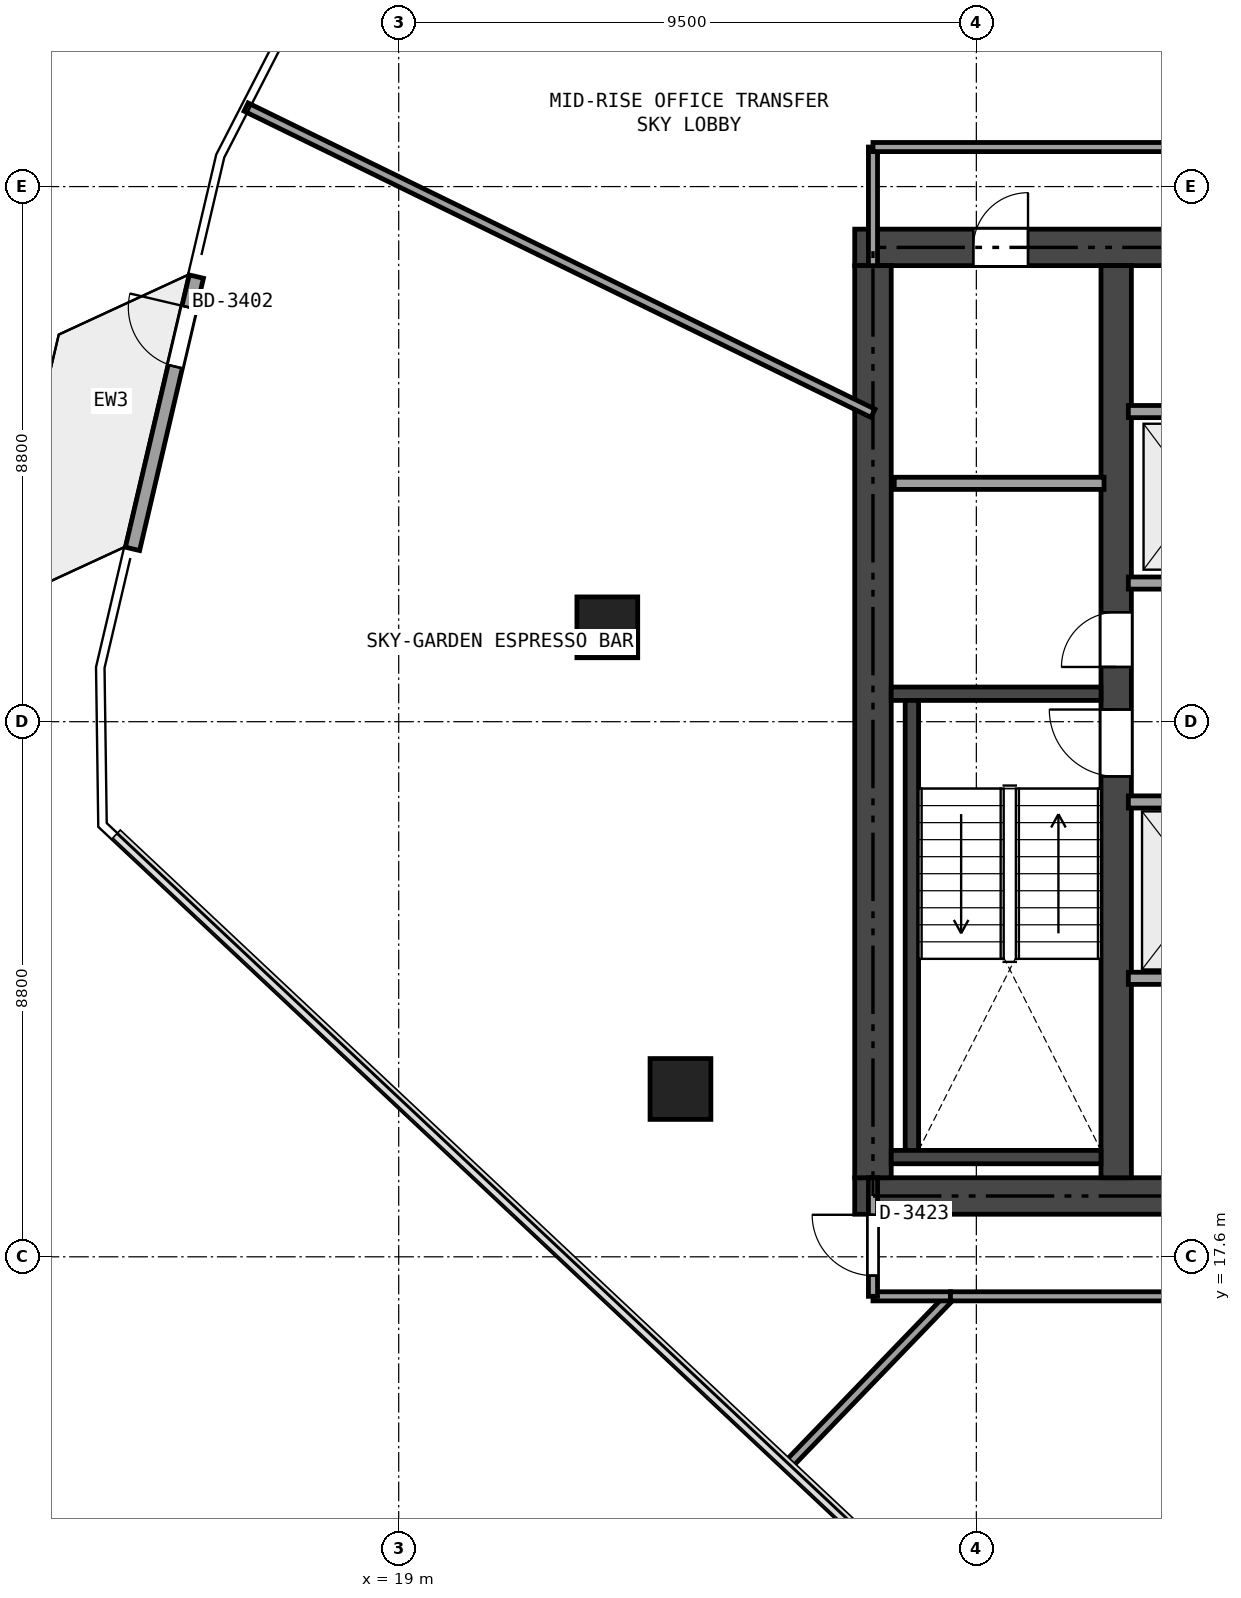
"""IFC4 building model, lengths in metres.
Left out: names, types, materials, properties, quantities, classifications, styles, units other than length and angle.
Written with IfcOpenShell. Run it as: python <this file> out.ifc"""

import sys

from ifc_helpers import new_model, si_unit, direction, frame, frame_2d, origin, origin_2d, place, context, subcontext, project, spatial, rectangle, extrude, element, fill, save


model = new_model("IFC4")
c1 = context("Model", 3, precision=1e-05, world=origin(), true_north=direction((0.0, 1.0)))
c2 = subcontext(c1, "Body", "Model", "MODEL_VIEW")
j1 = project(units=[si_unit("LENGTHUNIT", "METRE"), si_unit("PLANEANGLEUNIT", "RADIAN")], contexts=[c1])
p1 = place(None, origin())
s1 = spatial("IfcSite", under=j1, at=p1, CompositionType="ELEMENT")
p2 = place(p1, origin())
s2 = spatial("IfcBuilding", under=s1, at=p2, CompositionType="ELEMENT")
p3 = place(p2, frame((0.0, 0.0, 129.3)))
s3 = spatial("IfcBuildingStorey", under=s2, at=p3, CompositionType="ELEMENT", Elevation=129.3)
p4 = place(p3, frame((26.5, 18.6, 0.0), z_axis=(0.0, 0.0, 1.0), x_axis=(1.0, 0.0, 0.0)))
e1 = element("IfcWall", 1, at=p4, inside=s3, PredefinedType="SHEAR", context=c2, shape_type="SweptSolid", body=[
    extrude(rectangle(XDim=21.4, YDim=0.6, at=frame_2d((10.7, 0.0))), origin(), (0.0, 0.0, 1.0), 3.32),
])
p5 = place(p4, frame((12.425, 0.0, 0.0)))
e2 = element("IfcOpeningElement", 2, at=p5, cuts=e1, PredefinedType="OPENING", context=c2, shape_type="SweptSolid", body=[
    extrude(rectangle(XDim=1.15, YDim=2.15, at=frame_2d((0.575, 1.075))), frame((0.0, 0.31, 0.0), z_axis=(0.0, -1.0, 0.0), x_axis=(1.0, 0.0, 0.0)), (0.0, 0.0, 1.0), 0.62),
])
p6 = place(p4, frame((5.25, 0.0, 0.0)))
e3 = element("IfcOpeningElement", 3, at=p6, cuts=e1, PredefinedType="OPENING", context=c2, shape_type="SweptSolid", body=[
    extrude(rectangle(XDim=0.9, YDim=2.1, at=frame_2d((0.45, 1.05))), frame((0.0, 0.31, 0.0), z_axis=(0.0, -1.0, 0.0), x_axis=(1.0, 0.0, 0.0)), (0.0, 0.0, 1.0), 0.62),
])
p7 = place(p3, frame((26.5, 34.2, 0.0), z_axis=(0.0, 0.0, 1.0), x_axis=(1.0, 0.0, 0.0)))
e4 = element("IfcWall", 4, at=p7, inside=s3, PredefinedType="SHEAR", context=c2, shape_type="SweptSolid", body=[
    extrude(rectangle(XDim=21.4, YDim=0.6, at=frame_2d((10.7, 0.0))), origin(), (0.0, 0.0, 1.0), 3.32),
])
p8 = place(p7, frame((9.7, 0.0, 0.0)))
e5 = element("IfcOpeningElement", 5, at=p8, cuts=e4, PredefinedType="OPENING", context=c2, shape_type="SweptSolid", body=[
    extrude(rectangle(XDim=1.1, YDim=2.15, at=frame_2d((0.55, 1.075))), frame((0.0, 0.31, 0.0), z_axis=(0.0, -1.0, 0.0), x_axis=(1.0, 0.0, 0.0)), (0.0, 0.0, 1.0), 0.62),
])
p9 = place(p7, frame((1.95, 0.0, 0.0)))
e6 = element("IfcOpeningElement", 6, at=p9, cuts=e4, PredefinedType="OPENING", context=c2, shape_type="SweptSolid", body=[
    extrude(rectangle(XDim=0.9, YDim=2.1, at=frame_2d((0.45, 1.05))), frame((0.0, 0.31, 0.0), z_axis=(0.0, -1.0, 0.0), x_axis=(1.0, 0.0, 0.0)), (0.0, 0.0, 1.0), 0.62),
])
p10 = place(p7, frame((6.25, 0.0, 0.0)))
e7 = element("IfcOpeningElement", 7, at=p10, cuts=e4, PredefinedType="OPENING", context=c2, shape_type="SweptSolid", body=[
    extrude(rectangle(XDim=0.9, YDim=2.1, at=frame_2d((0.45, 1.05))), frame((0.0, 0.31, 0.0), z_axis=(0.0, -1.0, 0.0), x_axis=(1.0, 0.0, 0.0)), (0.0, 0.0, 1.0), 0.62),
])
p11 = place(p3, frame((26.8, 18.9, 0.0), z_axis=(0.0, 0.0, 1.0), x_axis=(0.0, 1.0, 0.0)))
e8 = element("IfcWall", 8, at=p11, inside=s3, PredefinedType="SHEAR", context=c2, shape_type="SweptSolid", body=[
    extrude(rectangle(XDim=15.0, YDim=0.6, at=frame_2d((7.5, 0.0))), origin(), (0.0, 0.0, 1.0), 3.32),
])
p12 = place(p3, frame((30.8, 18.9, 0.0), z_axis=(0.0, 0.0, 1.0), x_axis=(0.0, 1.0, 0.0)))
e9 = element("IfcWall", 9, at=p12, inside=s3, PredefinedType="SHEAR", context=c2, shape_type="SweptSolid", body=[
    extrude(rectangle(XDim=15.0, YDim=0.5, at=frame_2d((7.5, 0.0))), origin(), (0.0, 0.0, 1.0), 3.32),
])
p13 = place(p12, frame((6.6, 0.0, 0.0)))
e10 = element("IfcOpeningElement", 10, at=p13, cuts=e9, PredefinedType="OPENING", context=c2, shape_type="SweptSolid", body=[
    extrude(rectangle(XDim=1.1, YDim=2.15, at=frame_2d((0.55, 1.075))), frame((0.0, 0.26, 0.0), z_axis=(0.0, -1.0, 0.0), x_axis=(1.0, 0.0, 0.0)), (0.0, 0.0, 1.0), 0.52),
])
p14 = place(p12, frame((8.4, 0.0, 0.0)))
e11 = element("IfcOpeningElement", 11, at=p14, cuts=e9, PredefinedType="OPENING", context=c2, shape_type="SweptSolid", body=[
    extrude(rectangle(XDim=0.9, YDim=2.1, at=frame_2d((0.45, 1.05))), frame((0.0, 0.26, 0.0), z_axis=(0.0, -1.0, 0.0), x_axis=(1.0, 0.0, 0.0)), (0.0, 0.0, 1.0), 0.52),
])
p15 = place(p3, frame((27.1, 26.86, 0.0), z_axis=(0.0, 0.0, 1.0), x_axis=(1.0, 0.0, 0.0)))
e12 = element("IfcWall", 12, at=p15, inside=s3, PredefinedType="SHEAR", context=c2, shape_type="SweptSolid", body=[
    extrude(rectangle(XDim=3.45, YDim=0.22, at=frame_2d((1.725, 0.0))), origin(), (0.0, 0.0, 1.0), 3.32),
])
p16 = place(p3, frame((27.44, 19.35, 0.0), z_axis=(0.0, 0.0, 1.0), x_axis=(0.0, 1.0, 0.0)))
e13 = element("IfcWall", 13, at=p16, inside=s3, PredefinedType="SHEAR", context=c2, shape_type="SweptSolid", body=[
    extrude(rectangle(XDim=7.4, YDim=0.22, at=frame_2d((3.7, 0.0))), origin(), (0.0, 0.0, 1.0), 3.32),
])
p17 = place(p3, frame((27.1, 19.24, 0.0), z_axis=(0.0, 0.0, 1.0), x_axis=(1.0, 0.0, 0.0)))
e14 = element("IfcWall", 14, at=p17, inside=s3, PredefinedType="SHEAR", context=c2, shape_type="SweptSolid", body=[
    extrude(rectangle(XDim=3.45, YDim=0.22, at=frame_2d((1.725, 0.0))), origin(), (0.0, 0.0, 1.0), 3.32),
])
for number, where, z_axis, x_axis in (
    (15, (22.431, 27.952, 0.0), (0.0, 0.0, 1.0), (1.0, 0.0, 0.0)),
    (16, (23.634, 20.36, 0.0), (0.0, 0.0, 1.0), (1.0, 0.0, 0.0)),
):
    element("IfcColumn", number, at=place(p3, frame(where, z_axis=z_axis, x_axis=x_axis)), inside=s3, PredefinedType="COLUMN", context=c2, shape_type="SweptSolid", body=[
        extrude(rectangle(XDim=1.0, YDim=1.0, at=origin_2d()), origin(), (0.0, 0.0, 1.0), 3.32),
    ])
p18 = place(p3, frame((14.622, 29.242, 0.0), z_axis=(0.0, 0.0, 1.0), x_axis=(0.228296670508, 0.973591613684, 0.0)))
e17 = element("IfcWall", 17, at=p18, inside=s3, PredefinedType="SOLIDWALL", context=c2, shape_type="SweptSolid", body=[
    extrude(rectangle(XDim=4.6, YDim=0.24, at=frame_2d((2.3, 0.0))), origin(), (0.0, 0.0, 1.0), 3.32),
])
p19 = place(p18, frame((3.079, 0.0, 0.0)))
e18 = element("IfcOpeningElement", 18, at=p19, cuts=e17, PredefinedType="OPENING", context=c2, shape_type="SweptSolid", body=[
    extrude(rectangle(XDim=1.0, YDim=2.15, at=frame_2d((0.5, 1.075))), frame((0.0, 0.13, 0.0), z_axis=(0.0, -1.0, 0.0), x_axis=(1.0, 0.0, 0.0)), (0.0, 0.0, 1.0), 0.26),
])
p20 = place(p3, frame((27.15, 30.32, 0.0), z_axis=(0.0, 0.0, 1.0), x_axis=(1.0, 0.0, 0.0)))
e19 = element("IfcWall", 19, at=p20, inside=s3, PredefinedType="SOLIDWALL", context=c2, shape_type="SweptSolid", body=[
    extrude(rectangle(XDim=3.45, YDim=0.2, at=frame_2d((1.725, 0.0))), origin(), (0.0, 0.0, 1.0), 3.32),
])
p21 = place(p3, frame((31.0, 28.68, 0.0), z_axis=(0.0, 0.0, 1.0), x_axis=(1.0, 0.0, 0.0)))
e20 = element("IfcWall", 20, at=p21, inside=s3, PredefinedType="SOLIDWALL", context=c2, shape_type="SweptSolid", body=[
    extrude(rectangle(XDim=4.42, YDim=0.2, at=frame_2d((2.21, 0.0))), origin(), (0.0, 0.0, 1.0), 3.32),
])
p22 = place(p21, frame((0.6, 0.0, 0.0)))
e21 = element("IfcOpeningElement", 21, at=p22, cuts=e20, PredefinedType="OPENING", context=c2, shape_type="SweptSolid", body=[
    extrude(rectangle(XDim=1.1, YDim=2.15, at=frame_2d((0.55, 1.075))), frame((0.0, 0.11, 0.0), z_axis=(0.0, -1.0, 0.0), x_axis=(1.0, 0.0, 0.0)), (0.0, 0.0, 1.0), 0.22),
])
p23 = place(p21, frame((2.85, 0.0, 0.0)))
e22 = element("IfcOpeningElement", 22, at=p23, cuts=e20, PredefinedType="OPENING", context=c2, shape_type="SweptSolid", body=[
    extrude(rectangle(XDim=1.1, YDim=2.15, at=frame_2d((0.55, 1.075))), frame((0.0, 0.11, 0.0), z_axis=(0.0, -1.0, 0.0), x_axis=(1.0, 0.0, 0.0)), (0.0, 0.0, 1.0), 0.22),
])
p24 = place(p3, frame((31.0, 31.5, 0.0), z_axis=(0.0, 0.0, 1.0), x_axis=(1.0, 0.0, 0.0)))
e23 = element("IfcWall", 23, at=p24, inside=s3, PredefinedType="SOLIDWALL", context=c2, shape_type="SweptSolid", body=[
    extrude(rectangle(XDim=4.42, YDim=0.2, at=frame_2d((2.21, 0.0))), origin(), (0.0, 0.0, 1.0), 3.32),
])
p25 = place(p3, frame((31.0, 25.08, 0.0), z_axis=(0.0, 0.0, 1.0), x_axis=(1.0, 0.0, 0.0)))
e24 = element("IfcWall", 24, at=p25, inside=s3, PredefinedType="SOLIDWALL", context=c2, shape_type="SweptSolid", body=[
    extrude(rectangle(XDim=4.42, YDim=0.2, at=frame_2d((2.21, 0.0))), origin(), (0.0, 0.0, 1.0), 3.32),
])
p26 = place(p25, frame((3.0, 0.0, 0.0)))
e25 = element("IfcOpeningElement", 25, at=p26, cuts=e24, PredefinedType="OPENING", context=c2, shape_type="SweptSolid", body=[
    extrude(rectangle(XDim=0.9, YDim=2.1, at=frame_2d((0.45, 1.05))), frame((0.0, 0.11, 0.0), z_axis=(0.0, -1.0, 0.0), x_axis=(1.0, 0.0, 0.0)), (0.0, 0.0, 1.0), 0.22),
])
p27 = place(p25, frame((0.62, 0.0, 0.0)))
e26 = element("IfcOpeningElement", 26, at=p27, cuts=e24, PredefinedType="OPENING", context=c2, shape_type="SweptSolid", body=[
    extrude(rectangle(XDim=1.2, YDim=2.15, at=frame_2d((0.6, 1.075))), frame((0.0, 0.11, 0.0), z_axis=(0.0, -1.0, 0.0), x_axis=(1.0, 0.0, 0.0)), (0.0, 0.0, 1.0), 0.22),
])
p28 = place(p3, frame((31.0, 22.18, 0.0), z_axis=(0.0, 0.0, 1.0), x_axis=(1.0, 0.0, 0.0)))
e27 = element("IfcWall", 27, at=p28, inside=s3, PredefinedType="SOLIDWALL", context=c2, shape_type="SweptSolid", body=[
    extrude(rectangle(XDim=2.42, YDim=0.2, at=frame_2d((1.21, 0.0))), origin(), (0.0, 0.0, 1.0), 3.32),
])
p29 = place(p3, frame((16.49, 36.508, 0.0), z_axis=(0.0, 0.0, 1.0), x_axis=(0.898533562789, -0.4389048149, 0.0)))
e28 = element("IfcWall", 28, at=p29, inside=s3, PredefinedType="PARTITIONING", context=c2, shape_type="SweptSolid", body=[
    extrude(rectangle(XDim=11.474, YDim=0.15, at=frame_2d((5.737, 0.0))), origin(), (0.0, 0.0, 1.0), 2.805),
])
p30 = place(p3, frame((26.8, 33.9, 0.0), z_axis=(0.0, 0.0, 1.0), x_axis=(0.0, 1.0, 0.0)))
e29 = element("IfcWall", 29, at=p30, inside=s3, PredefinedType="PARTITIONING", context=c2, shape_type="SweptSolid", body=[
    extrude(rectangle(XDim=1.95, YDim=0.15, at=frame_2d((0.975, 0.0))), origin(), (0.0, 0.0, 1.0), 2.805),
])
p31 = place(p3, frame((26.8, 35.85, 0.0), z_axis=(0.0, 0.0, 1.0), x_axis=(1.0, 0.0, 0.0)))
e30 = element("IfcWall", 30, at=p31, inside=s3, PredefinedType="PARTITIONING", context=c2, shape_type="SweptSolid", body=[
    extrude(rectangle(XDim=11.33, YDim=0.15, at=frame_2d((5.665, 0.0))), origin(), (0.0, 0.0, 1.0), 2.687),
])
p32 = place(p31, frame((5.165, 0.0, 0.0)))
e31 = element("IfcOpeningElement", 31, at=p32, cuts=e30, PredefinedType="OPENING", context=c2, shape_type="SweptSolid", body=[
    extrude(rectangle(XDim=1.0, YDim=2.15, at=frame_2d((0.5, 1.075))), frame((0.0, 0.085, 0.0), z_axis=(0.0, -1.0, 0.0), x_axis=(1.0, 0.0, 0.0)), (0.0, 0.0, 1.0), 0.17),
])
p33 = place(p3, frame((25.378, 14.152, 0.0), z_axis=(0.0, 0.0, 1.0), x_axis=(0.693884355372, 0.720086454094, 0.0)))
e32 = element("IfcWall", 32, at=p33, inside=s3, PredefinedType="PARTITIONING", context=c2, shape_type="SweptSolid", body=[
    extrude(rectangle(XDim=3.885, YDim=0.15, at=frame_2d((1.943, 0.0))), origin(), (0.0, 0.0, 1.0), 2.805),
])
p34 = place(p3, frame((28.074, 16.95, 0.0), z_axis=(0.0, 0.0, 1.0), x_axis=(-1.0, 0.0, 0.0)))
e33 = element("IfcWall", 33, at=p34, inside=s3, PredefinedType="PARTITIONING", context=c2, shape_type="SweptSolid", body=[
    extrude(rectangle(XDim=1.274, YDim=0.15, at=frame_2d((0.637, 0.0))), origin(), (0.0, 0.0, 1.0), 2.805),
])
p35 = place(p3, frame((26.8, 16.95, 0.0), z_axis=(0.0, 0.0, 1.0), x_axis=(0.0, 1.0, 0.0)))
e34 = element("IfcWall", 34, at=p35, inside=s3, PredefinedType="PARTITIONING", context=c2, shape_type="SweptSolid", body=[
    extrude(rectangle(XDim=1.95, YDim=0.15, at=frame_2d((0.975, 0.0))), origin(), (0.0, 0.0, 1.0), 2.805),
])
p36 = place(p35, frame((0.341, 0.0, 0.0)))
e35 = element("IfcOpeningElement", 35, at=p36, cuts=e34, PredefinedType="OPENING", context=c2, shape_type="SweptSolid", body=[
    extrude(rectangle(XDim=1.0, YDim=2.15, at=frame_2d((0.5, 1.075))), frame((0.0, 0.085, 0.0), z_axis=(0.0, -1.0, 0.0), x_axis=(1.0, 0.0, 0.0)), (0.0, 0.0, 1.0), 0.17),
])
p37 = place(p3, frame((42.225, 16.95, 0.0), z_axis=(0.0, 0.0, 1.0), x_axis=(-1.0, 0.0, 0.0)))
e36 = element("IfcWall", 36, at=p37, inside=s3, PredefinedType="PARTITIONING", context=c2, shape_type="SweptSolid", body=[
    extrude(rectangle(XDim=14.151, YDim=0.15, at=frame_2d((7.076, 0.0))), origin(), (0.0, 0.0, 1.0), 2.687),
])
p38 = place(p37, frame((6.576, 0.0, 0.0)))
e37 = element("IfcOpeningElement", 37, at=p38, cuts=e36, PredefinedType="OPENING", context=c2, shape_type="SweptSolid", body=[
    extrude(rectangle(XDim=1.0, YDim=2.15, at=frame_2d((0.5, 1.075))), frame((0.0, 0.085, 0.0), z_axis=(0.0, -1.0, 0.0), x_axis=(1.0, 0.0, 0.0)), (0.0, 0.0, 1.0), 0.17),
])
p39 = place(p19, origin())
e38 = element("IfcDoor", 38, at=p39, inside=s3, OperationType="SINGLE_SWING_RIGHT", PredefinedType="DOOR", context=c2, shape_type="SweptSolid", body=[
    extrude(rectangle(XDim=1.0, YDim=2.15, at=frame_2d((0.5, 1.075))), frame((0.0, 0.025, 0.0), z_axis=(0.0, -1.0, 0.0), x_axis=(1.0, 0.0, 0.0)), (0.0, 0.0, 1.0), 0.05),
])
fill(e18, e38)
p40 = place(p13, origin())
e39 = element("IfcDoor", 39, at=p40, inside=s3, OperationType="SINGLE_SWING_RIGHT", PredefinedType="DOOR", context=c2, shape_type="SweptSolid", body=[
    extrude(rectangle(XDim=1.1, YDim=2.15, at=frame_2d((0.55, 1.075))), frame((0.0, 0.025, 0.0), z_axis=(0.0, -1.0, 0.0), x_axis=(1.0, 0.0, 0.0)), (0.0, 0.0, 1.0), 0.05),
])
fill(e10, e39)
p41 = place(p14, origin())
e40 = element("IfcDoor", 40, at=p41, inside=s3, OperationType="SINGLE_SWING_LEFT", PredefinedType="DOOR", context=c2, shape_type="SweptSolid", body=[
    extrude(rectangle(XDim=0.9, YDim=2.1, at=frame_2d((0.45, 1.05))), frame((0.0, 0.025, 0.0), z_axis=(0.0, -1.0, 0.0), x_axis=(1.0, 0.0, 0.0)), (0.0, 0.0, 1.0), 0.05),
])
fill(e11, e40)
p42 = place(p9, origin())
e41 = element("IfcDoor", 41, at=p42, inside=s3, OperationType="SINGLE_SWING_RIGHT", PredefinedType="DOOR", context=c2, shape_type="SweptSolid", body=[
    extrude(rectangle(XDim=0.9, YDim=2.1, at=frame_2d((0.45, 1.05))), frame((0.0, 0.025, 0.0), z_axis=(0.0, -1.0, 0.0), x_axis=(1.0, 0.0, 0.0)), (0.0, 0.0, 1.0), 0.05),
])
fill(e6, e41)
p43 = place(p36, origin())
e42 = element("IfcDoor", 42, at=p43, inside=s3, OperationType="SINGLE_SWING_RIGHT", PredefinedType="DOOR", context=c2, shape_type="SweptSolid", body=[
    extrude(rectangle(XDim=1.0, YDim=2.15, at=frame_2d((0.5, 1.075))), frame((0.0, 0.025, 0.0), z_axis=(0.0, -1.0, 0.0), x_axis=(1.0, 0.0, 0.0)), (0.0, 0.0, 1.0), 0.05),
])
fill(e35, e42)
save(model, sys.argv[1])
